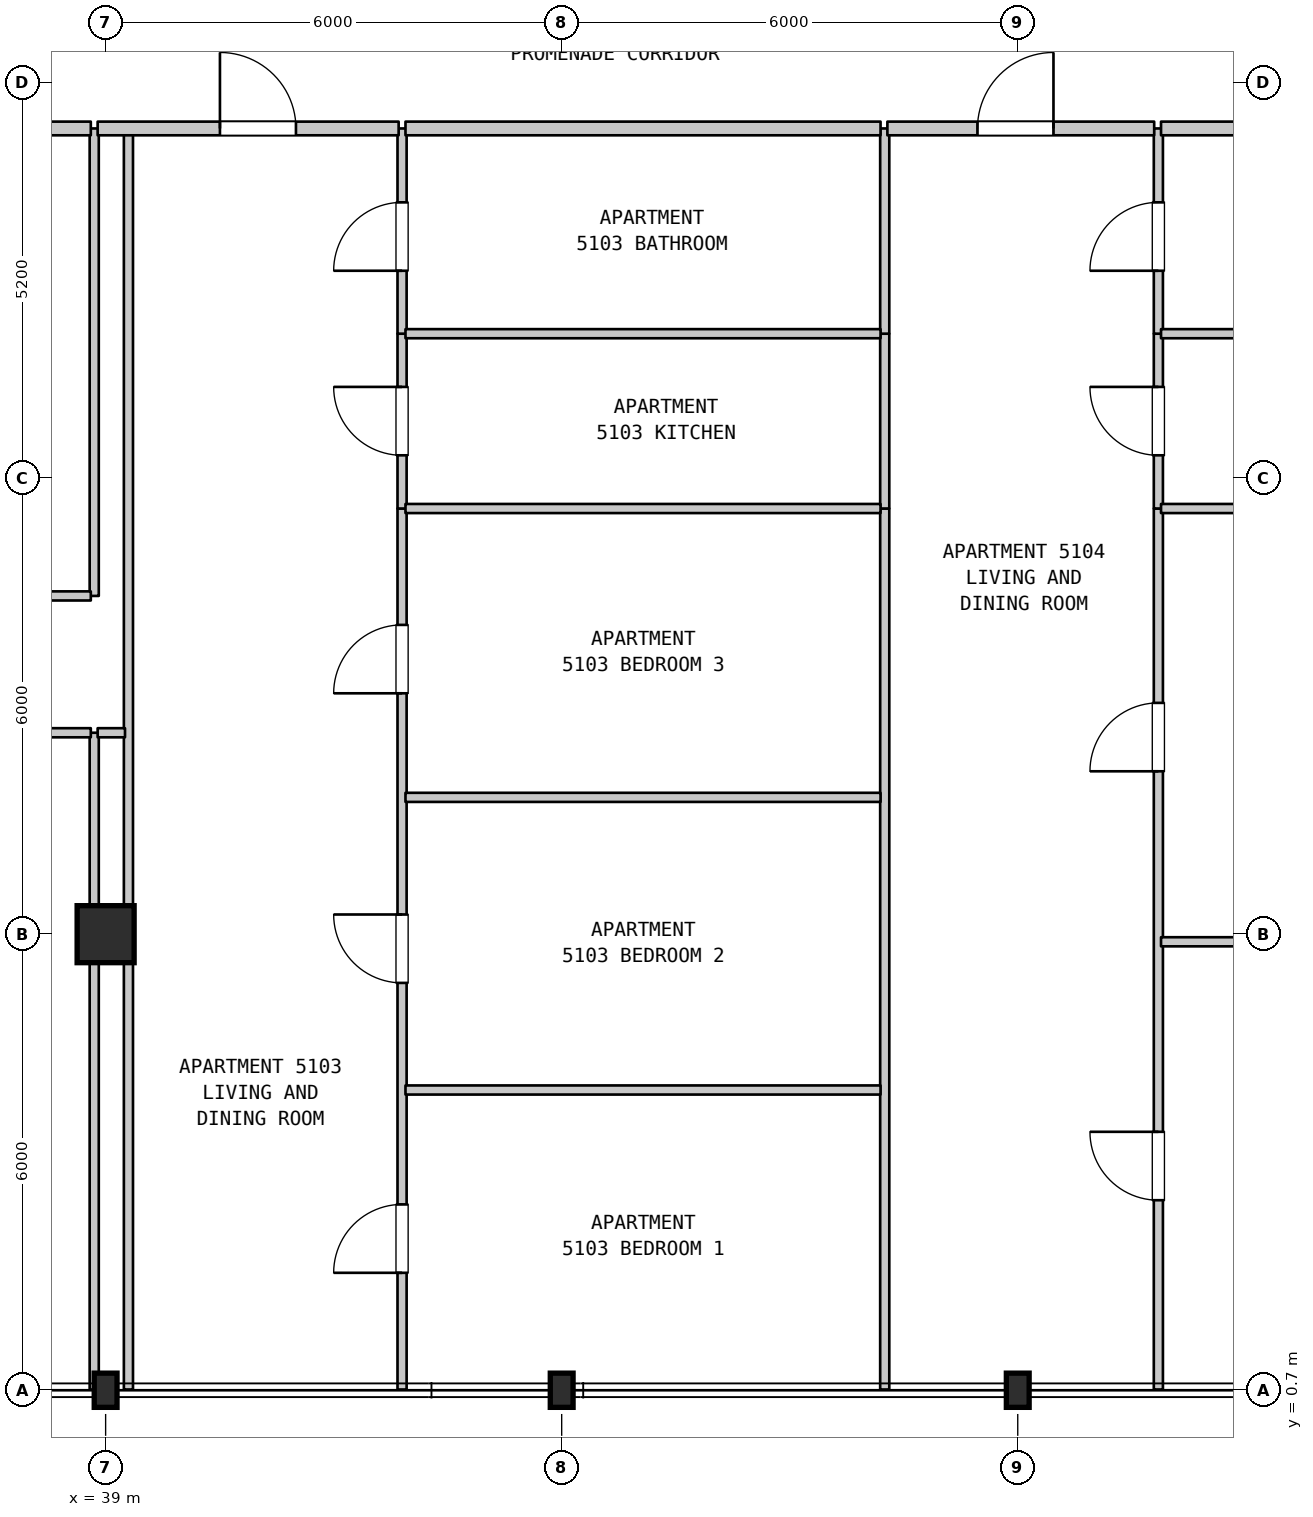
"""IFC4 building model, lengths in metres.
Left out: names, types, materials, properties, quantities, classifications, styles, units other than length and angle.
Written with IfcOpenShell. Run it as: python <this file> out.ifc"""

import sys

from ifc_helpers import new_model, si_unit, direction, frame, frame_2d, origin, origin_2d, place, context, subcontext, project, spatial, rectangle, i_section, extrude, element, fill, save


model = new_model("IFC4")
c1 = context("Model", 3, precision=1e-05, world=origin(), true_north=direction((0.0, 1.0)))
c2 = subcontext(c1, "Body", "Model", "MODEL_VIEW")
j1 = project(units=[si_unit("LENGTHUNIT", "METRE"), si_unit("PLANEANGLEUNIT", "RADIAN")], contexts=[c1])
p1 = place(None, origin())
s1 = spatial("IfcSite", under=j1, at=p1, CompositionType="ELEMENT")
p2 = place(p1, origin())
s2 = spatial("IfcBuilding", under=s1, at=p2, CompositionType="ELEMENT")
p3 = place(p2, frame((0.0, 0.0, 206.9)))
s3 = spatial("IfcBuildingStorey", under=s2, at=p3, CompositionType="ELEMENT", Elevation=206.9)
p4 = place(p3, frame((39.0, 0.7, 0.0), z_axis=(0.0, 0.0, 1.0), x_axis=(1.0, 0.0, 0.0)))
e1 = element("IfcColumn", 1, at=p4, inside=s3, PredefinedType="COLUMN", context=c2, shape_type="SweptSolid", body=[
    extrude(i_section(OverallWidth=0.3, OverallDepth=0.45, WebThickness=0.014, FlangeThickness=0.026, FilletRadius=0.027, at=origin_2d()), origin(), (0.0, 0.0, 1.0), 3.7),
])
p5 = place(p3, frame((39.0, 6.7, 0.0), z_axis=(0.0, 0.0, 1.0), x_axis=(1.0, 0.0, 0.0)))
e2 = element("IfcColumn", 2, at=p5, inside=s3, PredefinedType="COLUMN", context=c2, shape_type="SweptSolid", body=[
    extrude(rectangle(XDim=0.75, YDim=0.75, at=origin_2d()), origin(), (0.0, 0.0, 1.0), 3.7),
])
for number, where, z_axis, x_axis in (
    (3, (45.0, 0.7, 0.0), (0.0, 0.0, 1.0), (1.0, 0.0, 0.0)),
    (4, (51.0, 0.7, 0.0), (0.0, 0.0, 1.0), (1.0, 0.0, 0.0)),
):
    element("IfcColumn", number, at=place(p3, frame(where, z_axis=z_axis, x_axis=x_axis)), inside=s3, PredefinedType="COLUMN", context=c2, shape_type="SweptSolid", body=[
        extrude(i_section(OverallWidth=0.3, OverallDepth=0.45, WebThickness=0.014, FlangeThickness=0.026, FilletRadius=0.027, at=origin_2d()), origin(), (0.0, 0.0, 1.0), 3.7),
    ])
p6 = place(p3, frame((38.85, 0.71, 0.0), z_axis=(0.0, 0.0, 1.0), x_axis=(0.0, 1.0, 0.0)))
e5 = element("IfcWall", 5, at=p6, inside=s3, PredefinedType="PARTITIONING", context=c2, shape_type="SweptSolid", body=[
    extrude(rectangle(XDim=8.64, YDim=0.12, at=frame_2d((4.32, 0.0))), origin(), (0.0, 0.0, 1.0), 3.39),
])
p7 = place(p3, frame((38.85, 11.15, 0.0), z_axis=(0.0, 0.0, 1.0), x_axis=(0.0, 1.0, 0.0)))
e6 = element("IfcWall", 6, at=p7, inside=s3, PredefinedType="PARTITIONING", context=c2, shape_type="SweptSolid", body=[
    extrude(rectangle(XDim=6.15, YDim=0.12, at=frame_2d((3.075, 0.0))), origin(), (0.0, 0.0, 1.0), 3.39),
])
p8 = place(p3, frame((39.3, 0.71, 0.0), z_axis=(0.0, 0.0, 1.0), x_axis=(0.0, 1.0, 0.0)))
e7 = element("IfcWall", 7, at=p8, inside=s3, PredefinedType="PARTITIONING", context=c2, shape_type="SweptSolid", body=[
    extrude(rectangle(XDim=16.59, YDim=0.12, at=frame_2d((8.295, 0.0))), origin(), (0.0, 0.0, 1.0), 3.39),
])
p9 = place(p3, frame((42.9, 0.71, 0.0), z_axis=(0.0, 0.0, 1.0), x_axis=(0.0, 1.0, 0.0)))
e8 = element("IfcWall", 8, at=p9, inside=s3, PredefinedType="PARTITIONING", context=c2, shape_type="SweptSolid", body=[
    extrude(rectangle(XDim=11.59, YDim=0.12, at=frame_2d((5.795, 0.0))), origin(), (0.0, 0.0, 1.0), 3.39),
])
p10 = place(p9, frame((1.535, 0.0, 0.0)))
e9 = element("IfcOpeningElement", 9, at=p10, cuts=e8, PredefinedType="OPENING", context=c2, shape_type="SweptSolid", body=[
    extrude(rectangle(XDim=0.9, YDim=2.15, at=frame_2d((0.45, 1.075))), frame((0.0, 0.07, 0.0), z_axis=(0.0, -1.0, 0.0), x_axis=(1.0, 0.0, 0.0)), (0.0, 0.0, 1.0), 0.14),
])
p11 = place(p9, frame((5.349, 0.0, 0.0)))
e10 = element("IfcOpeningElement", 10, at=p11, cuts=e8, PredefinedType="OPENING", context=c2, shape_type="SweptSolid", body=[
    extrude(rectangle(XDim=0.9, YDim=2.15, at=frame_2d((0.45, 1.075))), frame((0.0, 0.07, 0.0), z_axis=(0.0, -1.0, 0.0), x_axis=(1.0, 0.0, 0.0)), (0.0, 0.0, 1.0), 0.14),
])
p12 = place(p9, frame((9.159, 0.0, 0.0)))
e11 = element("IfcOpeningElement", 11, at=p12, cuts=e8, PredefinedType="OPENING", context=c2, shape_type="SweptSolid", body=[
    extrude(rectangle(XDim=0.9, YDim=2.15, at=frame_2d((0.45, 1.075))), frame((0.0, 0.07, 0.0), z_axis=(0.0, -1.0, 0.0), x_axis=(1.0, 0.0, 0.0)), (0.0, 0.0, 1.0), 0.14),
])
p13 = place(p3, frame((42.9, 12.3, 0.0), z_axis=(0.0, 0.0, 1.0), x_axis=(0.0, 1.0, 0.0)))
e12 = element("IfcWall", 12, at=p13, inside=s3, PredefinedType="PARTITIONING", context=c2, shape_type="SweptSolid", body=[
    extrude(rectangle(XDim=2.3, YDim=0.12, at=frame_2d((1.15, 0.0))), origin(), (0.0, 0.0, 1.0), 3.39),
])
p14 = place(p13, frame((0.7, 0.0, 0.0)))
e13 = element("IfcOpeningElement", 13, at=p14, cuts=e12, PredefinedType="OPENING", context=c2, shape_type="SweptSolid", body=[
    extrude(rectangle(XDim=0.9, YDim=2.15, at=frame_2d((0.45, 1.075))), frame((0.0, 0.07, 0.0), z_axis=(0.0, -1.0, 0.0), x_axis=(1.0, 0.0, 0.0)), (0.0, 0.0, 1.0), 0.14),
])
p15 = place(p3, frame((42.9, 14.6, 0.0), z_axis=(0.0, 0.0, 1.0), x_axis=(0.0, 1.0, 0.0)))
e14 = element("IfcWall", 14, at=p15, inside=s3, PredefinedType="PARTITIONING", context=c2, shape_type="SweptSolid", body=[
    extrude(rectangle(XDim=2.7, YDim=0.12, at=frame_2d((1.35, 0.0))), origin(), (0.0, 0.0, 1.0), 3.39),
])
p16 = place(p15, frame((0.828, 0.0, 0.0)))
e15 = element("IfcOpeningElement", 15, at=p16, cuts=e14, PredefinedType="OPENING", context=c2, shape_type="SweptSolid", body=[
    extrude(rectangle(XDim=0.9, YDim=2.1, at=frame_2d((0.45, 1.05))), frame((0.0, 0.07, 0.0), z_axis=(0.0, -1.0, 0.0), x_axis=(1.0, 0.0, 0.0)), (0.0, 0.0, 1.0), 0.14),
])
p17 = place(p3, frame((49.25, 0.71, 0.0), z_axis=(0.0, 0.0, 1.0), x_axis=(0.0, 1.0, 0.0)))
e16 = element("IfcWall", 16, at=p17, inside=s3, PredefinedType="PARTITIONING", context=c2, shape_type="SweptSolid", body=[
    extrude(rectangle(XDim=11.59, YDim=0.12, at=frame_2d((5.795, 0.0))), origin(), (0.0, 0.0, 1.0), 3.39),
])
p18 = place(p3, frame((49.25, 12.3, 0.0), z_axis=(0.0, 0.0, 1.0), x_axis=(0.0, 1.0, 0.0)))
e17 = element("IfcWall", 17, at=p18, inside=s3, PredefinedType="PARTITIONING", context=c2, shape_type="SweptSolid", body=[
    extrude(rectangle(XDim=2.3, YDim=0.12, at=frame_2d((1.15, 0.0))), origin(), (0.0, 0.0, 1.0), 3.39),
])
p19 = place(p3, frame((49.25, 14.6, 0.0), z_axis=(0.0, 0.0, 1.0), x_axis=(0.0, 1.0, 0.0)))
e18 = element("IfcWall", 18, at=p19, inside=s3, PredefinedType="PARTITIONING", context=c2, shape_type="SweptSolid", body=[
    extrude(rectangle(XDim=2.7, YDim=0.12, at=frame_2d((1.35, 0.0))), origin(), (0.0, 0.0, 1.0), 3.39),
])
p20 = place(p3, frame((52.85, 0.71, 0.0), z_axis=(0.0, 0.0, 1.0), x_axis=(0.0, 1.0, 0.0)))
e19 = element("IfcWall", 19, at=p20, inside=s3, PredefinedType="PARTITIONING", context=c2, shape_type="SweptSolid", body=[
    extrude(rectangle(XDim=11.59, YDim=0.12, at=frame_2d((5.795, 0.0))), origin(), (0.0, 0.0, 1.0), 3.39),
])
p21 = place(p20, frame((2.49, 0.0, 0.0)))
e20 = element("IfcOpeningElement", 20, at=p21, cuts=e19, PredefinedType="OPENING", context=c2, shape_type="SweptSolid", body=[
    extrude(rectangle(XDim=0.9, YDim=2.15, at=frame_2d((0.45, 1.075))), frame((0.0, 0.07, 0.0), z_axis=(0.0, -1.0, 0.0), x_axis=(1.0, 0.0, 0.0)), (0.0, 0.0, 1.0), 0.14),
])
p22 = place(p20, frame((8.133, 0.0, 0.0)))
e21 = element("IfcOpeningElement", 21, at=p22, cuts=e19, PredefinedType="OPENING", context=c2, shape_type="SweptSolid", body=[
    extrude(rectangle(XDim=0.9, YDim=2.15, at=frame_2d((0.45, 1.075))), frame((0.0, 0.07, 0.0), z_axis=(0.0, -1.0, 0.0), x_axis=(1.0, 0.0, 0.0)), (0.0, 0.0, 1.0), 0.14),
])
p23 = place(p3, frame((52.85, 12.3, 0.0), z_axis=(0.0, 0.0, 1.0), x_axis=(0.0, 1.0, 0.0)))
e22 = element("IfcWall", 22, at=p23, inside=s3, PredefinedType="PARTITIONING", context=c2, shape_type="SweptSolid", body=[
    extrude(rectangle(XDim=2.3, YDim=0.12, at=frame_2d((1.15, 0.0))), origin(), (0.0, 0.0, 1.0), 3.39),
])
p24 = place(p23, frame((0.7, 0.0, 0.0)))
e23 = element("IfcOpeningElement", 23, at=p24, cuts=e22, PredefinedType="OPENING", context=c2, shape_type="SweptSolid", body=[
    extrude(rectangle(XDim=0.9, YDim=2.15, at=frame_2d((0.45, 1.075))), frame((0.0, 0.07, 0.0), z_axis=(0.0, -1.0, 0.0), x_axis=(1.0, 0.0, 0.0)), (0.0, 0.0, 1.0), 0.14),
])
p25 = place(p3, frame((52.85, 14.6, 0.0), z_axis=(0.0, 0.0, 1.0), x_axis=(0.0, 1.0, 0.0)))
e24 = element("IfcWall", 24, at=p25, inside=s3, PredefinedType="PARTITIONING", context=c2, shape_type="SweptSolid", body=[
    extrude(rectangle(XDim=2.7, YDim=0.12, at=frame_2d((1.35, 0.0))), origin(), (0.0, 0.0, 1.0), 3.39),
])
p26 = place(p25, frame((0.828, 0.0, 0.0)))
e25 = element("IfcOpeningElement", 25, at=p26, cuts=e24, PredefinedType="OPENING", context=c2, shape_type="SweptSolid", body=[
    extrude(rectangle(XDim=0.9, YDim=2.1, at=frame_2d((0.45, 1.05))), frame((0.0, 0.07, 0.0), z_axis=(0.0, -1.0, 0.0), x_axis=(1.0, 0.0, 0.0)), (0.0, 0.0, 1.0), 0.14),
])
p27 = place(p3, frame((42.945, 4.65, 0.0), z_axis=(0.0, 0.0, 1.0), x_axis=(1.0, 0.0, 0.0)))
e26 = element("IfcWall", 26, at=p27, inside=s3, PredefinedType="PARTITIONING", context=c2, shape_type="SweptSolid", body=[
    extrude(rectangle(XDim=6.25, YDim=0.12, at=frame_2d((3.125, 0.0))), origin(), (0.0, 0.0, 1.0), 3.39),
])
p28 = place(p3, frame((52.885, 6.6, 0.0), z_axis=(0.0, 0.0, 1.0), x_axis=(1.0, 0.0, 0.0)))
e27 = element("IfcWall", 27, at=p28, inside=s3, PredefinedType="PARTITIONING", context=c2, shape_type="SweptSolid", body=[
    extrude(rectangle(XDim=4.105, YDim=0.12, at=frame_2d((2.052, 0.0))), origin(), (0.0, 0.0, 1.0), 2.79),
])
p29 = place(p3, frame((42.945, 8.5, 0.0), z_axis=(0.0, 0.0, 1.0), x_axis=(1.0, 0.0, 0.0)))
e28 = element("IfcWall", 28, at=p29, inside=s3, PredefinedType="PARTITIONING", context=c2, shape_type="SweptSolid", body=[
    extrude(rectangle(XDim=6.25, YDim=0.12, at=frame_2d((3.125, 0.0))), origin(), (0.0, 0.0, 1.0), 3.39),
])
p30 = place(p3, frame((32.185, 9.35, 0.0), z_axis=(0.0, 0.0, 1.0), x_axis=(1.0, 0.0, 0.0)))
e29 = element("IfcWall", 29, at=p30, inside=s3, PredefinedType="PARTITIONING", context=c2, shape_type="SweptSolid", body=[
    extrude(rectangle(XDim=6.62, YDim=0.12, at=frame_2d((3.31, 0.0))), origin(), (0.0, 0.0, 1.0), 3.39),
])
p31 = place(p30, frame((1.285, 0.0, 0.0)))
e30 = element("IfcOpeningElement", 30, at=p31, cuts=e29, PredefinedType="OPENING", context=c2, shape_type="SweptSolid", body=[
    extrude(rectangle(XDim=0.9, YDim=2.15, at=frame_2d((0.45, 1.075))), frame((0.0, 0.07, 0.0), z_axis=(0.0, -1.0, 0.0), x_axis=(1.0, 0.0, 0.0)), (0.0, 0.0, 1.0), 0.14),
])
p32 = place(p30, frame((4.29, 0.0, 0.0)))
e31 = element("IfcOpeningElement", 31, at=p32, cuts=e29, PredefinedType="OPENING", context=c2, shape_type="SweptSolid", body=[
    extrude(rectangle(XDim=0.9, YDim=2.15, at=frame_2d((0.45, 1.075))), frame((0.0, 0.07, 0.0), z_axis=(0.0, -1.0, 0.0), x_axis=(1.0, 0.0, 0.0)), (0.0, 0.0, 1.0), 0.14),
])
p33 = place(p3, frame((38.895, 9.35, 0.0), z_axis=(0.0, 0.0, 1.0), x_axis=(1.0, 0.0, 0.0)))
e32 = element("IfcWall", 32, at=p33, inside=s3, PredefinedType="PARTITIONING", context=c2, shape_type="SweptSolid", body=[
    extrude(rectangle(XDim=0.36, YDim=0.12, at=frame_2d((0.18, 0.0))), origin(), (0.0, 0.0, 1.0), 3.39),
])
p34 = place(p3, frame((35.272, 11.15, 0.0), z_axis=(0.0, 0.0, 1.0), x_axis=(1.0, 0.0, 0.0)))
e33 = element("IfcWall", 33, at=p34, inside=s3, PredefinedType="PARTITIONING", context=c2, shape_type="SweptSolid", body=[
    extrude(rectangle(XDim=3.533, YDim=0.12, at=frame_2d((1.767, 0.0))), origin(), (0.0, 0.0, 1.0), 3.39),
])
p35 = place(p34, frame((1.243, 0.0, 0.0)))
e34 = element("IfcOpeningElement", 34, at=p35, cuts=e33, PredefinedType="OPENING", context=c2, shape_type="SweptSolid", body=[
    extrude(rectangle(XDim=0.9, YDim=2.1, at=frame_2d((0.45, 1.05))), frame((0.0, 0.07, 0.0), z_axis=(0.0, -1.0, 0.0), x_axis=(1.0, 0.0, 0.0)), (0.0, 0.0, 1.0), 0.14),
])
p36 = place(p3, frame((42.945, 12.3, 0.0), z_axis=(0.0, 0.0, 1.0), x_axis=(1.0, 0.0, 0.0)))
e35 = element("IfcWall", 35, at=p36, inside=s3, PredefinedType="PARTITIONING", context=c2, shape_type="SweptSolid", body=[
    extrude(rectangle(XDim=6.25, YDim=0.12, at=frame_2d((3.125, 0.0))), origin(), (0.0, 0.0, 1.0), 3.39),
])
p37 = place(p3, frame((52.885, 12.3, 0.0), z_axis=(0.0, 0.0, 1.0), x_axis=(1.0, 0.0, 0.0)))
e36 = element("IfcWall", 36, at=p37, inside=s3, PredefinedType="PARTITIONING", context=c2, shape_type="SweptSolid", body=[
    extrude(rectangle(XDim=4.105, YDim=0.12, at=frame_2d((2.052, 0.0))), origin(), (0.0, 0.0, 1.0), 3.39),
])
p38 = place(p3, frame((42.945, 14.6, 0.0), z_axis=(0.0, 0.0, 1.0), x_axis=(1.0, 0.0, 0.0)))
e37 = element("IfcWall", 37, at=p38, inside=s3, PredefinedType="PARTITIONING", context=c2, shape_type="SweptSolid", body=[
    extrude(rectangle(XDim=6.25, YDim=0.12, at=frame_2d((3.125, 0.0))), origin(), (0.0, 0.0, 1.0), 3.39),
])
p39 = place(p3, frame((52.885, 14.6, 0.0), z_axis=(0.0, 0.0, 1.0), x_axis=(1.0, 0.0, 0.0)))
e38 = element("IfcWall", 38, at=p39, inside=s3, PredefinedType="PARTITIONING", context=c2, shape_type="SweptSolid", body=[
    extrude(rectangle(XDim=4.105, YDim=0.12, at=frame_2d((2.052, 0.0))), origin(), (0.0, 0.0, 1.0), 3.39),
])
p40 = place(p3, frame((35.272, 17.3, 0.0), z_axis=(0.0, 0.0, 1.0), x_axis=(1.0, 0.0, 0.0)))
e39 = element("IfcWall", 39, at=p40, inside=s3, PredefinedType="STANDARD", context=c2, shape_type="SweptSolid", body=[
    extrude(rectangle(XDim=3.533, YDim=0.18, at=frame_2d((1.767, 0.0))), origin(), (0.0, 0.0, 1.0), 3.39),
])
p41 = place(p3, frame((38.895, 17.3, 0.0), z_axis=(0.0, 0.0, 1.0), x_axis=(1.0, 0.0, 0.0)))
e40 = element("IfcWall", 40, at=p41, inside=s3, PredefinedType="STANDARD", context=c2, shape_type="SweptSolid", body=[
    extrude(rectangle(XDim=3.96, YDim=0.18, at=frame_2d((1.98, 0.0))), origin(), (0.0, 0.0, 1.0), 3.39),
])
p42 = place(p41, frame((1.609, 0.0, 0.0)))
e41 = element("IfcOpeningElement", 41, at=p42, cuts=e40, PredefinedType="OPENING", context=c2, shape_type="SweptSolid", body=[
    extrude(rectangle(XDim=1.0, YDim=2.15, at=frame_2d((0.5, 1.075))), frame((0.0, 0.1, 0.0), z_axis=(0.0, -1.0, 0.0), x_axis=(1.0, 0.0, 0.0)), (0.0, 0.0, 1.0), 0.2),
])
p43 = place(p3, frame((42.945, 17.3, 0.0), z_axis=(0.0, 0.0, 1.0), x_axis=(1.0, 0.0, 0.0)))
e42 = element("IfcWall", 42, at=p43, inside=s3, PredefinedType="STANDARD", context=c2, shape_type="SweptSolid", body=[
    extrude(rectangle(XDim=6.25, YDim=0.18, at=frame_2d((3.125, 0.0))), origin(), (0.0, 0.0, 1.0), 3.39),
])
p44 = place(p3, frame((49.285, 17.3, 0.0), z_axis=(0.0, 0.0, 1.0), x_axis=(1.0, 0.0, 0.0)))
e43 = element("IfcWall", 43, at=p44, inside=s3, PredefinedType="STANDARD", context=c2, shape_type="SweptSolid", body=[
    extrude(rectangle(XDim=3.51, YDim=0.18, at=frame_2d((1.755, 0.0))), origin(), (0.0, 0.0, 1.0), 3.39),
])
p45 = place(p44, frame((1.185, 0.0, 0.0)))
e44 = element("IfcOpeningElement", 44, at=p45, cuts=e43, PredefinedType="OPENING", context=c2, shape_type="SweptSolid", body=[
    extrude(rectangle(XDim=1.0, YDim=2.15, at=frame_2d((0.5, 1.075))), frame((0.0, 0.1, 0.0), z_axis=(0.0, -1.0, 0.0), x_axis=(1.0, 0.0, 0.0)), (0.0, 0.0, 1.0), 0.2),
])
p46 = place(p3, frame((52.885, 17.3, 0.0), z_axis=(0.0, 0.0, 1.0), x_axis=(1.0, 0.0, 0.0)))
e45 = element("IfcWall", 45, at=p46, inside=s3, PredefinedType="STANDARD", context=c2, shape_type="SweptSolid", body=[
    extrude(rectangle(XDim=1.695, YDim=0.18, at=frame_2d((0.848, 0.0))), origin(), (0.0, 0.0, 1.0), 3.39),
])
p47 = place(p10, origin())
e46 = element("IfcDoor", 46, at=p47, inside=s3, OperationType="SINGLE_SWING_LEFT", PredefinedType="DOOR", context=c2, shape_type="SweptSolid", body=[
    extrude(rectangle(XDim=0.9, YDim=2.15, at=frame_2d((0.45, 1.075))), frame((0.0, 0.025, 0.0), z_axis=(0.0, -1.0, 0.0), x_axis=(1.0, 0.0, 0.0)), (0.0, 0.0, 1.0), 0.05),
])
fill(e9, e46)
p48 = place(p11, origin())
e47 = element("IfcDoor", 47, at=p48, inside=s3, OperationType="SINGLE_SWING_RIGHT", PredefinedType="DOOR", context=c2, shape_type="SweptSolid", body=[
    extrude(rectangle(XDim=0.9, YDim=2.15, at=frame_2d((0.45, 1.075))), frame((0.0, 0.025, 0.0), z_axis=(0.0, -1.0, 0.0), x_axis=(1.0, 0.0, 0.0)), (0.0, 0.0, 1.0), 0.05),
])
fill(e10, e47)
p49 = place(p12, origin())
e48 = element("IfcDoor", 48, at=p49, inside=s3, OperationType="SINGLE_SWING_LEFT", PredefinedType="DOOR", context=c2, shape_type="SweptSolid", body=[
    extrude(rectangle(XDim=0.9, YDim=2.15, at=frame_2d((0.45, 1.075))), frame((0.0, 0.025, 0.0), z_axis=(0.0, -1.0, 0.0), x_axis=(1.0, 0.0, 0.0)), (0.0, 0.0, 1.0), 0.05),
])
fill(e11, e48)
p50 = place(p14, origin())
e49 = element("IfcDoor", 49, at=p50, inside=s3, OperationType="SINGLE_SWING_RIGHT", PredefinedType="DOOR", context=c2, shape_type="SweptSolid", body=[
    extrude(rectangle(XDim=0.9, YDim=2.15, at=frame_2d((0.45, 1.075))), frame((0.0, 0.025, 0.0), z_axis=(0.0, -1.0, 0.0), x_axis=(1.0, 0.0, 0.0)), (0.0, 0.0, 1.0), 0.05),
])
fill(e13, e49)
p51 = place(p16, origin())
e50 = element("IfcDoor", 50, at=p51, inside=s3, OperationType="SINGLE_SWING_LEFT", PredefinedType="DOOR", context=c2, shape_type="SweptSolid", body=[
    extrude(rectangle(XDim=0.9, YDim=2.1, at=frame_2d((0.45, 1.05))), frame((0.0, 0.025, 0.0), z_axis=(0.0, -1.0, 0.0), x_axis=(1.0, 0.0, 0.0)), (0.0, 0.0, 1.0), 0.05),
])
fill(e15, e50)
p52 = place(p21, origin())
e51 = element("IfcDoor", 51, at=p52, inside=s3, OperationType="SINGLE_SWING_RIGHT", PredefinedType="DOOR", context=c2, shape_type="SweptSolid", body=[
    extrude(rectangle(XDim=0.9, YDim=2.15, at=frame_2d((0.45, 1.075))), frame((0.0, 0.025, 0.0), z_axis=(0.0, -1.0, 0.0), x_axis=(1.0, 0.0, 0.0)), (0.0, 0.0, 1.0), 0.05),
])
fill(e20, e51)
p53 = place(p22, origin())
e52 = element("IfcDoor", 52, at=p53, inside=s3, OperationType="SINGLE_SWING_LEFT", PredefinedType="DOOR", context=c2, shape_type="SweptSolid", body=[
    extrude(rectangle(XDim=0.9, YDim=2.15, at=frame_2d((0.45, 1.075))), frame((0.0, 0.025, 0.0), z_axis=(0.0, -1.0, 0.0), x_axis=(1.0, 0.0, 0.0)), (0.0, 0.0, 1.0), 0.05),
])
fill(e21, e52)
p54 = place(p24, origin())
e53 = element("IfcDoor", 53, at=p54, inside=s3, OperationType="SINGLE_SWING_RIGHT", PredefinedType="DOOR", context=c2, shape_type="SweptSolid", body=[
    extrude(rectangle(XDim=0.9, YDim=2.15, at=frame_2d((0.45, 1.075))), frame((0.0, 0.025, 0.0), z_axis=(0.0, -1.0, 0.0), x_axis=(1.0, 0.0, 0.0)), (0.0, 0.0, 1.0), 0.05),
])
fill(e23, e53)
p55 = place(p26, origin())
e54 = element("IfcDoor", 54, at=p55, inside=s3, OperationType="SINGLE_SWING_LEFT", PredefinedType="DOOR", context=c2, shape_type="SweptSolid", body=[
    extrude(rectangle(XDim=0.9, YDim=2.1, at=frame_2d((0.45, 1.05))), frame((0.0, 0.025, 0.0), z_axis=(0.0, -1.0, 0.0), x_axis=(1.0, 0.0, 0.0)), (0.0, 0.0, 1.0), 0.05),
])
fill(e25, e54)
p56 = place(p42, origin())
e55 = element("IfcDoor", 55, at=p56, inside=s3, OperationType="SINGLE_SWING_LEFT", PredefinedType="DOOR", context=c2, shape_type="SweptSolid", body=[
    extrude(rectangle(XDim=1.0, YDim=2.15, at=frame_2d((0.5, 1.075))), frame((0.0, 0.025, 0.0), z_axis=(0.0, -1.0, 0.0), x_axis=(1.0, 0.0, 0.0)), (0.0, 0.0, 1.0), 0.05),
])
fill(e41, e55)
p57 = place(p45, origin())
e56 = element("IfcDoor", 56, at=p57, inside=s3, OperationType="SINGLE_SWING_RIGHT", PredefinedType="DOOR", context=c2, shape_type="SweptSolid", body=[
    extrude(rectangle(XDim=1.0, YDim=2.15, at=frame_2d((0.5, 1.075))), frame((0.0, 0.025, 0.0), z_axis=(0.0, -1.0, 0.0), x_axis=(1.0, 0.0, 0.0)), (0.0, 0.0, 1.0), 0.05),
])
fill(e44, e56)
save(model, sys.argv[1])
